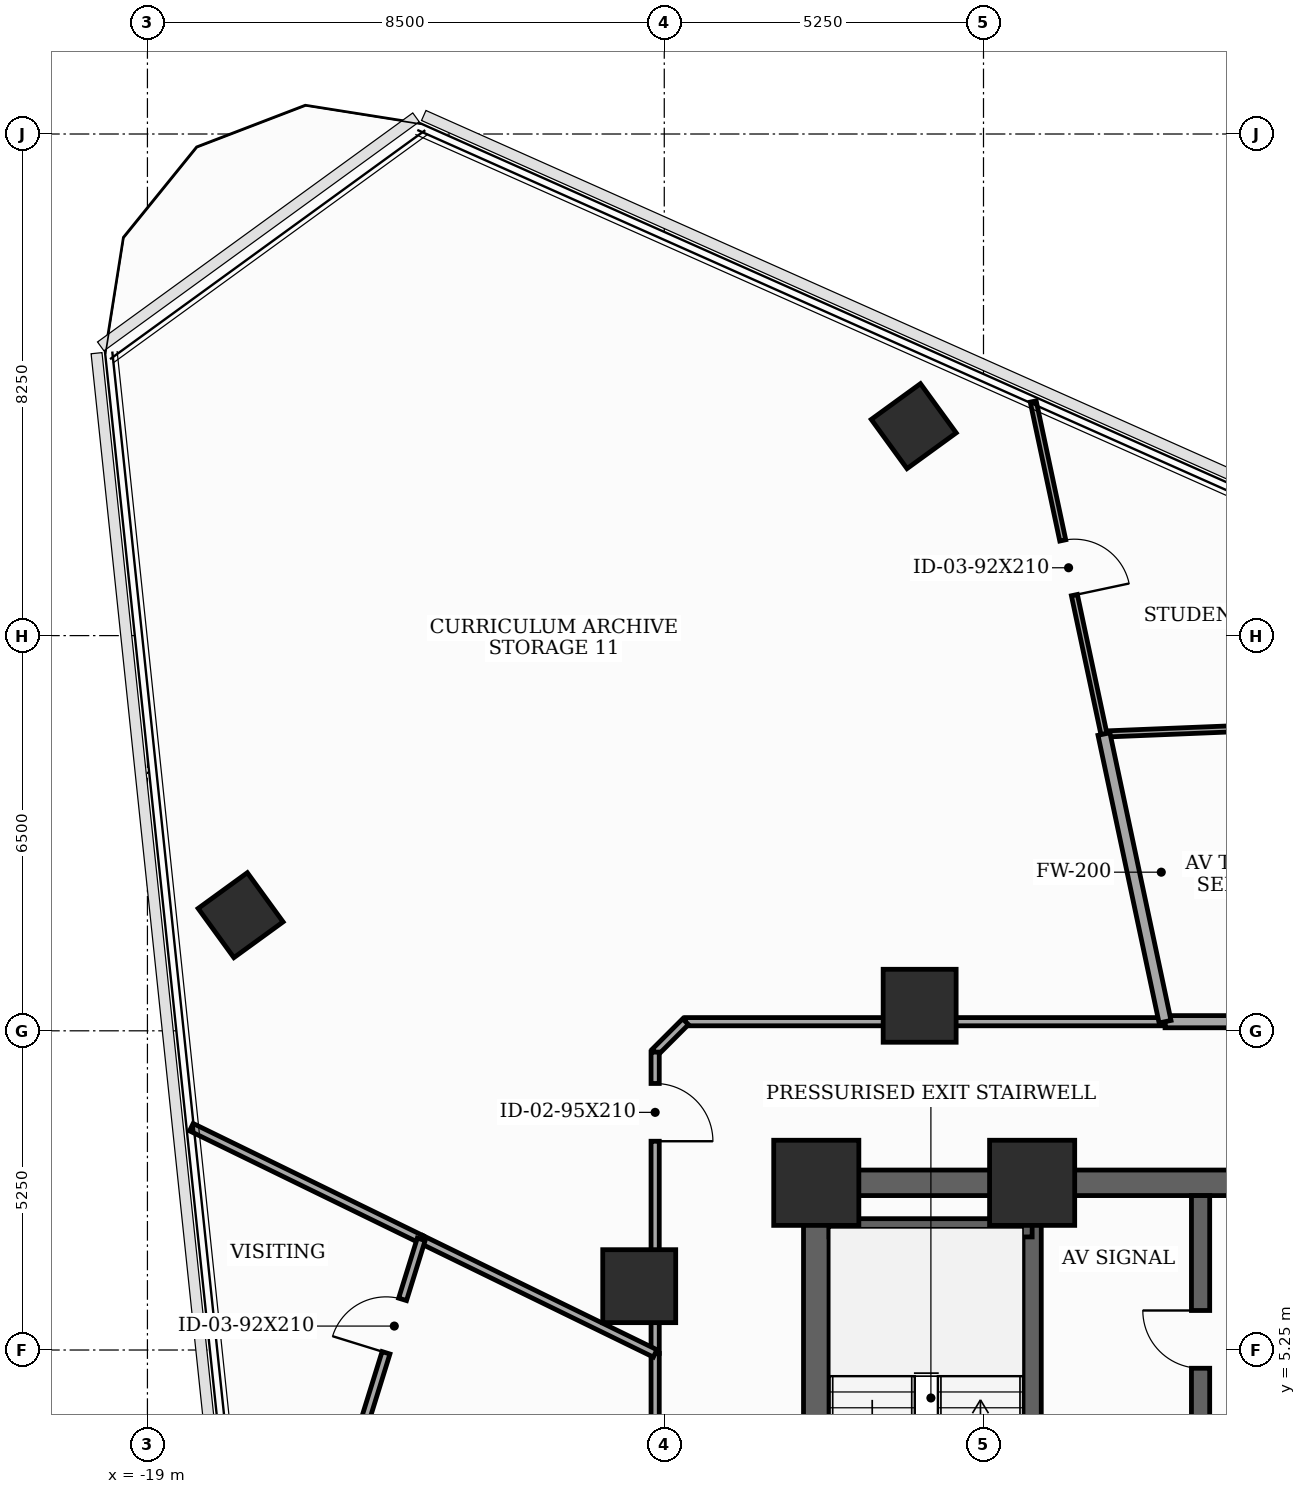
"""IFC4 building model, lengths in metres.
Left out: names, types, materials, properties, quantities, classifications, styles, units other than length and angle.
Written with IfcOpenShell. Run it as: python <this file> out.ifc"""

import sys

from ifc_helpers import new_model, si_unit, direction, frame, frame_2d, origin, origin_2d, place, context, subcontext, project, spatial, rectangle, extrude, element, fill, save


model = new_model("IFC4")
c1 = context("Model", 3, precision=1e-05, world=origin(), true_north=direction((0.0, 1.0)))
c2 = subcontext(c1, "Body", "Model", "MODEL_VIEW")
j1 = project(units=[si_unit("LENGTHUNIT", "METRE"), si_unit("PLANEANGLEUNIT", "RADIAN")], contexts=[c1])
p1 = place(None, origin())
s1 = spatial("IfcSite", under=j1, at=p1, CompositionType="ELEMENT")
p2 = place(p1, origin())
s2 = spatial("IfcBuilding", under=s1, at=p2, CompositionType="ELEMENT")
p3 = place(p2, frame((0.0, 0.0, 169.4)))
s3 = spatial("IfcBuildingStorey", under=s2, at=p3, CompositionType="ELEMENT", Elevation=169.4)
for number, where, z_axis, x_axis in (
    (1, (-4.45, 8.0, 0.0), (0.0, 0.0, 1.0), (1.0, 0.0, 0.0)),
    (2, (-8.0, 8.0, 0.0), (0.0, 0.0, 1.0), (1.0, 0.0, 0.0)),
):
    element("IfcColumn", number, at=place(p3, frame(where, z_axis=z_axis, x_axis=x_axis)), inside=s3, PredefinedType="COLUMN", context=c2, shape_type="SweptSolid", body=[
        extrude(rectangle(XDim=1.4, YDim=1.4, at=origin_2d()), origin(), (0.0, 0.0, 1.0), 3.7),
    ])
for number, where, z_axis, x_axis in (
    (3, (-6.3, 10.912, 0.0), (0.0, 0.0, 1.0), (1.0, 0.0, 0.0)),
    (4, (-10.912, 6.3, 0.0), (0.0, 0.0, 1.0), (1.0, 0.0, 0.0)),
):
    element("IfcColumn", number, at=place(p3, frame(where, z_axis=z_axis, x_axis=x_axis)), inside=s3, PredefinedType="COLUMN", context=c2, shape_type="SweptSolid", body=[
        extrude(rectangle(XDim=1.2, YDim=1.2, at=origin_2d()), origin(), (0.0, 0.0, 1.0), 3.7),
    ])
for number, where, z_axis, x_axis in (
    (5, (-6.397, 20.445, 0.0), (0.0, 0.0, 1.0), (0.809, 0.588, 0.0)),
    (6, (-17.468, 12.402, 0.0), (0.0, 0.0, 1.0), (0.809, 0.588, 0.0)),
):
    element("IfcColumn", number, at=place(p3, frame(where, z_axis=z_axis, x_axis=x_axis)), inside=s3, PredefinedType="COLUMN", context=c2, shape_type="SweptSolid", body=[
        extrude(rectangle(XDim=1.0, YDim=1.0, at=origin_2d()), origin(), (0.0, 0.0, 1.0), 3.7),
    ])
p4 = place(p3, frame((-8.0, -8.0, 0.0), z_axis=(0.0, 0.0, 1.0), x_axis=(0.0, 1.0, 0.0)))
e7 = element("IfcWall", 7, at=p4, inside=s3, PredefinedType="SHEAR", context=c2, shape_type="SweptSolid", body=[
    extrude(rectangle(XDim=16.0, YDim=0.42, at=frame_2d((8.0, 0.0))), origin(), (0.0, 0.0, 1.0), 3.5),
])
p5 = place(p4, frame((0.922, 0.0, 0.0)))
e8 = element("IfcOpeningElement", 8, at=p5, cuts=e7, PredefinedType="OPENING", context=c2, shape_type="SweptSolid", body=[
    extrude(rectangle(XDim=0.85, YDim=2.02, at=frame_2d((0.425, 1.01))), frame((0.0, 0.22, 0.0), z_axis=(0.0, -1.0, 0.0), x_axis=(1.0, 0.0, 0.0)), (0.0, 0.0, 1.0), 0.44),
])
p6 = place(p4, frame((5.35, 0.0, 0.0)))
e9 = element("IfcOpeningElement", 9, at=p6, cuts=e7, PredefinedType="OPENING", context=c2, shape_type="SweptSolid", body=[
    extrude(rectangle(XDim=1.05, YDim=2.15, at=frame_2d((0.525, 1.075))), frame((0.0, 0.22, 0.0), z_axis=(0.0, -1.0, 0.0), x_axis=(1.0, 0.0, 0.0)), (0.0, 0.0, 1.0), 0.44),
])
p7 = place(p3, frame((-8.0, 8.0, 0.0), z_axis=(0.0, 0.0, 1.0), x_axis=(1.0, 0.0, 0.0)))
e10 = element("IfcWall", 10, at=p7, inside=s3, PredefinedType="SHEAR", context=c2, shape_type="SweptSolid", body=[
    extrude(rectangle(XDim=16.0, YDim=0.42, at=frame_2d((8.0, 0.0))), origin(), (0.0, 0.0, 1.0), 3.5),
])
p8 = place(p7, frame((7.1, 0.0, 0.0)))
e11 = element("IfcOpeningElement", 11, at=p8, cuts=e10, PredefinedType="OPENING", context=c2, shape_type="SweptSolid", body=[
    extrude(rectangle(XDim=1.8, YDim=2.15, at=frame_2d((0.9, 1.075))), frame((0.0, 0.22, 0.0), z_axis=(0.0, -1.0, 0.0), x_axis=(1.0, 0.0, 0.0)), (0.0, 0.0, 1.0), 0.44),
])
p9 = place(p3, frame((-4.45, -7.79, 0.0), z_axis=(0.0, 0.0, 1.0), x_axis=(0.0, 1.0, 0.0)))
e12 = element("IfcWall", 12, at=p9, inside=s3, PredefinedType="SHEAR", context=c2, shape_type="SweptSolid", body=[
    extrude(rectangle(XDim=15.58, YDim=0.3, at=frame_2d((7.79, 0.0))), origin(), (0.0, 0.0, 1.0), 3.5),
])
p10 = place(p3, frame((-7.79, 7.26, 0.0), z_axis=(0.0, 0.0, 1.0), x_axis=(1.0, 0.0, 0.0)))
e13 = element("IfcWall", 13, at=p10, inside=s3, PredefinedType="SHEAR", context=c2, shape_type="SweptSolid", body=[
    extrude(rectangle(XDim=3.34, YDim=0.3, at=frame_2d((1.67, 0.0))), origin(), (0.0, 0.0, 1.0), 3.5),
])
p11 = place(p3, frame((-1.68, -4.85, 0.0), z_axis=(0.0, 0.0, 1.0), x_axis=(0.0, 1.0, 0.0)))
e14 = element("IfcWall", 14, at=p11, inside=s3, PredefinedType="SHEAR", context=c2, shape_type="SweptSolid", body=[
    extrude(rectangle(XDim=12.64, YDim=0.3, at=frame_2d((6.32, 0.0))), origin(), (0.0, 0.0, 1.0), 3.5),
])
p12 = place(p11, frame((3.5, 0.0, 0.0)))
e15 = element("IfcOpeningElement", 15, at=p12, cuts=e14, PredefinedType="OPENING", context=c2, shape_type="SweptSolid", body=[
    extrude(rectangle(XDim=0.95, YDim=2.1, at=frame_2d((0.475, 1.05))), frame((0.0, 0.16, 0.0), z_axis=(0.0, -1.0, 0.0), x_axis=(1.0, 0.0, 0.0)), (0.0, 0.0, 1.0), 0.32),
])
p13 = place(p11, frame((9.8, 0.0, 0.0)))
e16 = element("IfcOpeningElement", 16, at=p13, cuts=e14, PredefinedType="OPENING", context=c2, shape_type="SweptSolid", body=[
    extrude(rectangle(XDim=0.95, YDim=2.1, at=frame_2d((0.475, 1.05))), frame((0.0, 0.16, 0.0), z_axis=(0.0, -1.0, 0.0), x_axis=(1.0, 0.0, 0.0)), (0.0, 0.0, 1.0), 0.32),
])
p14 = place(p3, frame((10.15, 10.65, 0.0), z_axis=(0.0, 0.0, 1.0), x_axis=(-1.0, 0.0, 0.0)))
e17 = element("IfcWall", 17, at=p14, inside=s3, PredefinedType="SOLIDWALL", context=c2, shape_type="SweptSolid", body=[
    extrude(rectangle(XDim=12.414, YDim=0.2, at=frame_2d((6.207, 0.0))), origin(), (0.0, 0.0, 1.0), 2.885),
])
p15 = place(p14, frame((7.222, 0.0, 0.0)))
e18 = element("IfcOpeningElement", 18, at=p15, cuts=e17, PredefinedType="OPENING", context=c2, shape_type="SweptSolid", body=[
    extrude(rectangle(XDim=0.95, YDim=2.1, at=frame_2d((0.475, 1.05))), frame((0.0, 0.11, 0.0), z_axis=(0.0, -1.0, 0.0), x_axis=(1.0, 0.0, 0.0)), (0.0, 0.0, 1.0), 0.22),
])
p16 = place(p3, frame((-2.264, 10.65, 0.0), z_axis=(0.0, 0.0, 1.0), x_axis=(-1.0, 0.0, 0.0)))
e19 = element("IfcWall", 19, at=p16, inside=s3, PredefinedType="PARTITIONING", context=c2, shape_type="SweptSolid", body=[
    extrude(rectangle(XDim=7.886, YDim=0.135, at=frame_2d((3.943, 0.0))), origin(), (0.0, 0.0, 1.0), 2.885),
])
p17 = place(p3, frame((-10.15, 10.65, 0.0), z_axis=(0.0, 0.0, 1.0), x_axis=(-0.707106781187, -0.707106781187, 0.0)))
e20 = element("IfcWall", 20, at=p17, inside=s3, PredefinedType="PARTITIONING", context=c2, shape_type="SweptSolid", body=[
    extrude(rectangle(XDim=0.707, YDim=0.135, at=frame_2d((0.354, 0.0))), origin(), (0.0, 0.0, 1.0), 3.5),
])
p18 = place(p3, frame((-10.65, 10.15, 0.0), z_axis=(0.0, 0.0, 1.0), x_axis=(0.0, -1.0, 0.0)))
e21 = element("IfcWall", 21, at=p18, inside=s3, PredefinedType="PARTITIONING", context=c2, shape_type="SweptSolid", body=[
    extrude(rectangle(XDim=4.956, YDim=0.135, at=frame_2d((2.478, 0.0))), origin(), (0.0, 0.0, 1.0), 2.885),
])
p19 = place(p18, frame((0.516, 0.0, 0.0)))
e22 = element("IfcOpeningElement", 22, at=p19, cuts=e21, PredefinedType="OPENING", context=c2, shape_type="SweptSolid", body=[
    extrude(rectangle(XDim=0.95, YDim=2.1, at=frame_2d((0.475, 1.05))), frame((0.0, 0.077, 0.0), z_axis=(0.0, -1.0, 0.0), x_axis=(1.0, 0.0, 0.0)), (0.0, 0.0, 1.0), 0.155),
])
p20 = place(p3, frame((-10.65, 5.194, 0.0), z_axis=(0.0, 0.0, 1.0), x_axis=(0.0, -1.0, 0.0)))
e23 = element("IfcWall", 23, at=p20, inside=s3, PredefinedType="PARTITIONING", context=c2, shape_type="SweptSolid", body=[
    extrude(rectangle(XDim=2.744, YDim=0.135, at=frame_2d((1.372, 0.0))), origin(), (0.0, 0.0, 1.0), 3.5),
])
p21 = place(p20, frame((1.226, 0.0, 0.0)))
e24 = element("IfcOpeningElement", 24, at=p21, cuts=e23, PredefinedType="OPENING", context=c2, shape_type="SweptSolid", body=[
    extrude(rectangle(XDim=0.95, YDim=2.1, at=frame_2d((0.475, 1.05))), frame((0.0, 0.077, 0.0), z_axis=(0.0, -1.0, 0.0), x_axis=(1.0, 0.0, 0.0)), (0.0, 0.0, 1.0), 0.155),
])
p22 = place(p3, frame((-3.269, 15.381, 0.0), z_axis=(0.0, 0.0, 1.0), x_axis=(0.999171753478, 0.040691609114, 0.0)))
e25 = element("IfcWall", 25, at=p22, inside=s3, PredefinedType="MOVABLE", context=c2, shape_type="SweptSolid", body=[
    extrude(rectangle(XDim=5.7, YDim=0.1, at=frame_2d((2.85, 0.0))), origin(), (0.0, 0.0, 1.0), 2.885),
])
p23 = place(p3, frame((-4.432, 20.851, 0.0), z_axis=(0.0, 0.0, 1.0), x_axis=(0.208032106743, -0.978121997792, 0.0)))
e26 = element("IfcWall", 26, at=p23, inside=s3, PredefinedType="MOVABLE", context=c2, shape_type="SweptSolid", body=[
    extrude(rectangle(XDim=5.592, YDim=0.1, at=frame_2d((2.796, 0.0))), origin(), (0.0, 0.0, 1.0), 2.985),
])
p24 = place(p23, frame((2.336, 0.0, 0.0)))
e27 = element("IfcOpeningElement", 27, at=p24, cuts=e26, PredefinedType="OPENING", context=c2, shape_type="SweptSolid", body=[
    extrude(rectangle(XDim=0.92, YDim=2.1, at=frame_2d((0.46, 1.05))), frame((0.0, 0.06, 0.0), z_axis=(0.0, -1.0, 0.0), x_axis=(1.0, 0.0, 0.0)), (0.0, 0.0, 1.0), 0.12),
])
p25 = place(p3, frame((-3.269, 15.381, 0.0), z_axis=(0.0, 0.0, 1.0), x_axis=(0.207808649559, -0.978169497157, 0.0)))
e28 = element("IfcWall", 28, at=p25, inside=s3, PredefinedType="SOLIDWALL", context=c2, shape_type="SweptSolid", body=[
    extrude(rectangle(XDim=4.837, YDim=0.2, at=frame_2d((2.418, 0.0))), origin(), (0.0, 0.0, 1.0), 2.885),
])
p26 = place(p3, frame((-18.277, 8.915, 0.0), z_axis=(0.0, 0.0, 1.0), x_axis=(0.898795221882, -0.43836873648, 0.0)))
e29 = element("IfcWall", 29, at=p26, inside=s3, PredefinedType="PARTITIONING", context=c2, shape_type="SweptSolid", body=[
    extrude(rectangle(XDim=4.206, YDim=0.135, at=frame_2d((2.103, 0.0))), origin(), (0.0, 0.0, 1.0), 2.985),
])
p27 = place(p3, frame((-14.497, 7.071, 0.0), z_axis=(0.0, 0.0, 1.0), x_axis=(0.89874213328, -0.438477568261, 0.0)))
e30 = element("IfcWall", 30, at=p27, inside=s3, PredefinedType="PARTITIONING", context=c2, shape_type="SweptSolid", body=[
    extrude(rectangle(XDim=4.281, YDim=0.135, at=frame_2d((2.14, 0.0))), origin(), (0.0, 0.0, 1.0), 2.885),
])
p28 = place(p3, frame((-16.079, 1.974, 0.0), z_axis=(0.0, 0.0, 1.0), x_axis=(0.296438064518, 0.955052079158, 0.0)))
e31 = element("IfcWall", 31, at=p28, inside=s3, PredefinedType="PARTITIONING", context=c2, shape_type="SweptSolid", body=[
    extrude(rectangle(XDim=5.337, YDim=0.135, at=frame_2d((2.668, 0.0))), origin(), (0.0, 0.0, 1.0), 2.885),
])
p29 = place(p28, frame((3.383, 0.0, 0.0)))
e32 = element("IfcOpeningElement", 32, at=p29, cuts=e31, PredefinedType="OPENING", context=c2, shape_type="SweptSolid", body=[
    extrude(rectangle(XDim=0.92, YDim=2.1, at=frame_2d((0.46, 1.05))), frame((0.0, 0.077, 0.0), z_axis=(0.0, -1.0, 0.0), x_axis=(1.0, 0.0, 0.0)), (0.0, 0.0, 1.0), 0.155),
])
p30 = place(p13, origin())
e33 = element("IfcDoor", 33, at=p30, inside=s3, OperationType="SINGLE_SWING_RIGHT", PredefinedType="DOOR", context=c2, shape_type="SweptSolid", body=[
    extrude(rectangle(XDim=0.95, YDim=2.1, at=frame_2d((0.475, 1.05))), frame((0.0, 0.025, 0.0), z_axis=(0.0, -1.0, 0.0), x_axis=(1.0, 0.0, 0.0)), (0.0, 0.0, 1.0), 0.05),
])
fill(e16, e33)
p31 = place(p19, origin())
e34 = element("IfcDoor", 34, at=p31, inside=s3, OperationType="SINGLE_SWING_RIGHT", PredefinedType="DOOR", context=c2, shape_type="SweptSolid", body=[
    extrude(rectangle(XDim=0.95, YDim=2.1, at=frame_2d((0.475, 1.05))), frame((0.0, 0.025, 0.0), z_axis=(0.0, -1.0, 0.0), x_axis=(1.0, 0.0, 0.0)), (0.0, 0.0, 1.0), 0.05),
])
fill(e22, e34)
p32 = place(p24, origin())
e35 = element("IfcDoor", 35, at=p32, inside=s3, OperationType="SINGLE_SWING_RIGHT", PredefinedType="DOOR", context=c2, shape_type="SweptSolid", body=[
    extrude(rectangle(XDim=0.92, YDim=2.1, at=frame_2d((0.46, 1.05))), frame((0.0, 0.025, 0.0), z_axis=(0.0, -1.0, 0.0), x_axis=(1.0, 0.0, 0.0)), (0.0, 0.0, 1.0), 0.05),
])
fill(e27, e35)
p33 = place(p29, origin())
e36 = element("IfcDoor", 36, at=p33, inside=s3, OperationType="SINGLE_SWING_LEFT", PredefinedType="DOOR", context=c2, shape_type="SweptSolid", body=[
    extrude(rectangle(XDim=0.92, YDim=2.1, at=frame_2d((0.46, 1.05))), frame((0.0, 0.025, 0.0), z_axis=(0.0, -1.0, 0.0), x_axis=(1.0, 0.0, 0.0)), (0.0, 0.0, 1.0), 0.05),
])
fill(e32, e36)
save(model, sys.argv[1])
